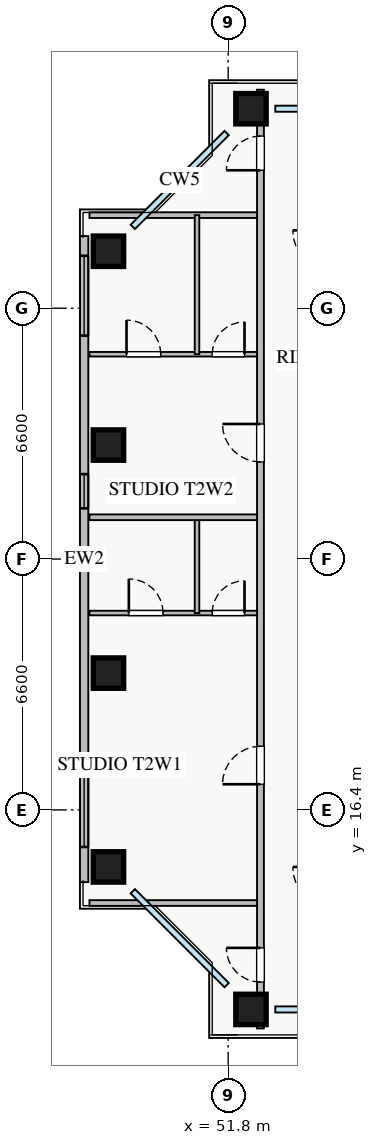
"""IFC4 building model, lengths in metres.
Left out: names, types, materials, properties, quantities, classifications, styles, units other than length and angle.
Written with IfcOpenShell. Run it as: python <this file> out.ifc"""

import sys

from ifc_helpers import new_model, si_unit, direction, frame, frame_2d, origin, origin_2d, place, context, subcontext, project, spatial, rectangle, extrude, source, transform, mapped, element, fill, save


model = new_model("IFC4")
c1 = context("Model", 3, precision=1e-05, world=origin(), true_north=direction((0.0, 1.0)))
c2 = subcontext(c1, "Body", "Model", "MODEL_VIEW")
j1 = project(units=[si_unit("LENGTHUNIT", "METRE"), si_unit("PLANEANGLEUNIT", "RADIAN")], contexts=[c1])
p1 = place(None, origin())
s1 = spatial("IfcSite", under=j1, at=p1, CompositionType="ELEMENT")
p2 = place(p1, origin())
s2 = spatial("IfcBuilding", under=s1, at=p2, CompositionType="ELEMENT")
p3 = place(p2, frame((0.0, 0.0, 73.0)))
s3 = spatial("IfcBuildingStorey", under=s2, at=p3, CompositionType="ELEMENT", Elevation=73.0)
m1 = source(origin(), c2, "Body", "SweptSolid", [
    extrude(rectangle(XDim=0.8, YDim=0.8, at=origin_2d()), origin(), (0.0, 0.0, 1.0), 3.25),
])
for number, where, z_axis, x_axis in (
    (1, (52.4, 11.15, 0.0), (0.0, 0.0, 1.0), (1.0, 0.0, 0.0)),
    (2, (52.4, 34.85, 0.0), (0.0, 0.0, 1.0), (1.0, 0.0, 0.0)),
    (3, (48.65, 14.9, 0.0), (0.0, 0.0, 1.0), (1.0, 0.0, 0.0)),
    (4, (48.65, 20.0, 0.0), (0.0, 0.0, 1.0), (1.0, 0.0, 0.0)),
    (5, (48.65, 26.0, 0.0), (0.0, 0.0, 1.0), (1.0, 0.0, 0.0)),
    (6, (48.65, 31.1, 0.0), (0.0, 0.0, 1.0), (1.0, 0.0, 0.0)),
):
    element("IfcColumn", number, at=place(p3, frame(where, z_axis=z_axis, x_axis=x_axis)), inside=s3, PredefinedType="COLUMN", context=c2, shape_type="MappedRepresentation", body=[
        mapped(m1, transform((0.0, 0.0, 0.0), x_axis=(1.0, 0.0, 0.0), y_axis=(0.0, 1.0, 0.0), z_axis=(0.0, 0.0, 1.0), scale=1.0)),
    ])
p4 = place(p3, frame((48.01, 14.5, 0.0), z_axis=(0.0, 0.0, 1.0), x_axis=(0.0, 1.0, 0.0)))
e7 = element("IfcWall", 7, at=p4, inside=s3, PredefinedType="STANDARD", context=c2, shape_type="SweptSolid", body=[
    extrude(rectangle(XDim=17.0, YDim=0.22, at=frame_2d((8.5, 0.0))), origin(), (0.0, 0.0, 1.0), 2.61),
])
p5 = place(p4, frame((0.925, 0.0, 0.9)))
e8 = element("IfcOpeningElement", 8, at=p5, cuts=e7, PredefinedType="OPENING", context=c2, shape_type="SweptSolid", body=[
    extrude(rectangle(XDim=2.4, YDim=1.48, at=frame_2d((1.2, 0.74))), frame((0.0, 0.12, 0.0), z_axis=(0.0, -1.0, 0.0), x_axis=(1.0, 0.0, 0.0)), (0.0, 0.0, 1.0), 0.24),
])
p6 = place(p4, frame((14.38, 0.0, 0.9)))
e9 = element("IfcOpeningElement", 9, at=p6, cuts=e7, PredefinedType="OPENING", context=c2, shape_type="SweptSolid", body=[
    extrude(rectangle(XDim=2.1, YDim=1.5, at=frame_2d((1.05, 0.75))), frame((0.0, 0.12, 0.0), z_axis=(0.0, -1.0, 0.0), x_axis=(1.0, 0.0, 0.0)), (0.0, 0.0, 1.0), 0.24),
])
p7 = place(p4, frame((9.835, 0.0, 0.9)))
e10 = element("IfcOpeningElement", 10, at=p7, cuts=e7, PredefinedType="OPENING", context=c2, shape_type="SweptSolid", body=[
    extrude(rectangle(XDim=0.9, YDim=1.2, at=frame_2d((0.45, 0.6))), frame((0.0, 0.12, 0.0), z_axis=(0.0, -1.0, 0.0), x_axis=(1.0, 0.0, 0.0)), (0.0, 0.0, 1.0), 0.24),
])
for number, where, z_axis, x_axis in (
    (11, (48.15, 32.05, 0.0), (0.0, 0.0, 1.0), (1.0, 0.0, 0.0)),
    (12, (48.15, 13.95, 0.0), (0.0, 0.0, 1.0), (1.0, 0.0, 0.0)),
):
    element("IfcWall", number, at=place(p3, frame(where, z_axis=z_axis, x_axis=x_axis)), inside=s3, PredefinedType="PARTITIONING", context=c2, shape_type="SweptSolid", body=[
        extrude(rectangle(XDim=4.5, YDim=0.15, at=frame_2d((2.25, 0.0))), origin(), (0.0, 0.0, 1.0), 3.07),
    ])
p8 = place(p3, frame((48.15, 21.58, 0.0), z_axis=(0.0, 0.0, 1.0), x_axis=(1.0, 0.0, 0.0)))
e13 = element("IfcWall", 13, at=p8, inside=s3, PredefinedType="PLUMBINGWALL", context=c2, shape_type="SweptSolid", body=[
    extrude(rectangle(XDim=4.5, YDim=0.12, at=frame_2d((2.25, 0.0))), origin(), (0.0, 0.0, 1.0), 3.07),
])
p9 = place(p8, frame((1.036, 0.0, 0.0)))
e14 = element("IfcOpeningElement", 14, at=p9, cuts=e13, PredefinedType="OPENING", context=c2, shape_type="SweptSolid", body=[
    extrude(rectangle(XDim=0.9, YDim=2.05, at=frame_2d((0.45, 1.025))), frame((0.0, 0.07, 0.0), z_axis=(0.0, -1.0, 0.0), x_axis=(1.0, 0.0, 0.0)), (0.0, 0.0, 1.0), 0.14),
])
p10 = place(p8, frame((3.23, 0.0, 0.0)))
e15 = element("IfcOpeningElement", 15, at=p10, cuts=e13, PredefinedType="OPENING", context=c2, shape_type="SweptSolid", body=[
    extrude(rectangle(XDim=0.85, YDim=2.05, at=frame_2d((0.425, 1.025))), frame((0.0, 0.07, 0.0), z_axis=(0.0, -1.0, 0.0), x_axis=(1.0, 0.0, 0.0)), (0.0, 0.0, 1.0), 0.14),
])
p11 = place(p3, frame((50.98, 21.58, 0.0), z_axis=(0.0, 0.0, 1.0), x_axis=(0.0, 1.0, 0.0)))
e16 = element("IfcWall", 16, at=p11, inside=s3, PredefinedType="PLUMBINGWALL", context=c2, shape_type="SweptSolid", body=[
    extrude(rectangle(XDim=2.52, YDim=0.12, at=frame_2d((1.26, 0.0))), origin(), (0.0, 0.0, 1.0), 3.07),
])
p12 = place(p3, frame((48.15, 28.39, 0.0), z_axis=(0.0, 0.0, 1.0), x_axis=(1.0, 0.0, 0.0)))
e17 = element("IfcWall", 17, at=p12, inside=s3, PredefinedType="PLUMBINGWALL", context=c2, shape_type="SweptSolid", body=[
    extrude(rectangle(XDim=4.5, YDim=0.12, at=frame_2d((2.25, 0.0))), origin(), (0.0, 0.0, 1.0), 3.07),
])
p13 = place(p12, frame((0.975, 0.0, 0.0)))
e18 = element("IfcOpeningElement", 18, at=p13, cuts=e17, PredefinedType="OPENING", context=c2, shape_type="SweptSolid", body=[
    extrude(rectangle(XDim=0.9, YDim=2.05, at=frame_2d((0.45, 1.025))), frame((0.0, 0.07, 0.0), z_axis=(0.0, -1.0, 0.0), x_axis=(1.0, 0.0, 0.0)), (0.0, 0.0, 1.0), 0.14),
])
p14 = place(p12, frame((3.23, 0.0, 0.0)))
e19 = element("IfcOpeningElement", 19, at=p14, cuts=e17, PredefinedType="OPENING", context=c2, shape_type="SweptSolid", body=[
    extrude(rectangle(XDim=0.85, YDim=2.05, at=frame_2d((0.425, 1.025))), frame((0.0, 0.07, 0.0), z_axis=(0.0, -1.0, 0.0), x_axis=(1.0, 0.0, 0.0)), (0.0, 0.0, 1.0), 0.14),
])
p15 = place(p3, frame((50.98, 28.39, 0.0), z_axis=(0.0, 0.0, 1.0), x_axis=(0.0, 1.0, 0.0)))
e20 = element("IfcWall", 20, at=p15, inside=s3, PredefinedType="PLUMBINGWALL", context=c2, shape_type="SweptSolid", body=[
    extrude(rectangle(XDim=3.66, YDim=0.12, at=frame_2d((1.83, 0.0))), origin(), (0.0, 0.0, 1.0), 3.07),
])
p16 = place(p3, frame((48.15, 24.1, 0.0), z_axis=(0.0, 0.0, 1.0), x_axis=(1.0, 0.0, 0.0)))
e21 = element("IfcWall", 21, at=p16, inside=s3, PredefinedType="PARTITIONING", context=c2, shape_type="SweptSolid", body=[
    extrude(rectangle(XDim=4.5, YDim=0.15, at=frame_2d((2.25, 0.0))), origin(), (0.0, 0.0, 1.0), 3.07),
])
p17 = place(p3, frame((52.65, 10.65, 0.0), z_axis=(0.0, 0.0, 1.0), x_axis=(0.0, 1.0, 0.0)))
e22 = element("IfcWall", 22, at=p17, inside=s3, PredefinedType="PARTITIONING", context=c2, shape_type="SweptSolid", body=[
    extrude(rectangle(XDim=24.7, YDim=0.18, at=frame_2d((12.35, 0.0))), origin(), (0.0, 0.0, 1.0), 2.615),
])
p18 = place(p17, frame((22.58, 0.0, 0.0)))
e23 = element("IfcOpeningElement", 23, at=p18, cuts=e22, PredefinedType="OPENING", context=c2, shape_type="SweptSolid", body=[
    extrude(rectangle(XDim=0.9, YDim=2.05, at=frame_2d((0.45, 1.025))), frame((0.0, 0.1, 0.0), z_axis=(0.0, -1.0, 0.0), x_axis=(1.0, 0.0, 0.0)), (0.0, 0.0, 1.0), 0.2),
])
p19 = place(p17, frame((1.22, 0.0, 0.0)))
e24 = element("IfcOpeningElement", 24, at=p19, cuts=e22, PredefinedType="OPENING", context=c2, shape_type="SweptSolid", body=[
    extrude(rectangle(XDim=0.9, YDim=2.05, at=frame_2d((0.45, 1.025))), frame((0.0, 0.1, 0.0), z_axis=(0.0, -1.0, 0.0), x_axis=(1.0, 0.0, 0.0)), (0.0, 0.0, 1.0), 0.2),
])
p20 = place(p17, frame((6.425, 0.0, 0.0)))
e25 = element("IfcOpeningElement", 25, at=p20, cuts=e22, PredefinedType="OPENING", context=c2, shape_type="SweptSolid", body=[
    extrude(rectangle(XDim=1.0, YDim=2.05, at=frame_2d((0.5, 1.025))), frame((0.0, 0.1, 0.0), z_axis=(0.0, -1.0, 0.0), x_axis=(1.0, 0.0, 0.0)), (0.0, 0.0, 1.0), 0.2),
])
p21 = place(p17, frame((14.905, 0.0, 0.0)))
e26 = element("IfcOpeningElement", 26, at=p21, cuts=e22, PredefinedType="OPENING", context=c2, shape_type="SweptSolid", body=[
    extrude(rectangle(XDim=1.0, YDim=2.05, at=frame_2d((0.5, 1.025))), frame((0.0, 0.1, 0.0), z_axis=(0.0, -1.0, 0.0), x_axis=(1.0, 0.0, 0.0)), (0.0, 0.0, 1.0), 0.2),
])
m2 = source(origin(), c2, "Body", "SweptSolid", [
    extrude(rectangle(XDim=2.4, YDim=1.48, at=frame_2d((1.2, 0.74))), frame((0.0, 0.03, 0.0), z_axis=(0.0, -1.0, 0.0), x_axis=(1.0, 0.0, 0.0)), (0.0, 0.0, 1.0), 0.06),
])
p22 = place(p5, origin())
e27 = element("IfcWindow", 27, at=p22, inside=s3, PartitioningType="TRIPLE_PANEL_VERTICAL", PredefinedType="WINDOW", context=c2, shape_type="MappedRepresentation", body=[
    mapped(m2, transform((0.0, 0.0, 0.0), x_axis=(1.0, 0.0, 0.0), y_axis=(0.0, 1.0, 0.0), z_axis=(0.0, 0.0, 1.0), scale=1.0)),
])
fill(e8, e27)
m3 = source(origin(), c2, "Body", "SweptSolid", [
    extrude(rectangle(XDim=2.1, YDim=1.5, at=frame_2d((1.05, 0.75))), frame((0.0, 0.03, 0.0), z_axis=(0.0, -1.0, 0.0), x_axis=(1.0, 0.0, 0.0)), (0.0, 0.0, 1.0), 0.06),
])
p23 = place(p6, origin())
e28 = element("IfcWindow", 28, at=p23, inside=s3, PartitioningType="TRIPLE_PANEL_VERTICAL", PredefinedType="WINDOW", context=c2, shape_type="MappedRepresentation", body=[
    mapped(m3, transform((0.0, 0.0, 0.0), x_axis=(1.0, 0.0, 0.0), y_axis=(0.0, 1.0, 0.0), z_axis=(0.0, 0.0, 1.0), scale=1.0)),
])
fill(e9, e28)
m4 = source(origin(), c2, "Body", "SweptSolid", [
    extrude(rectangle(XDim=0.9, YDim=2.05, at=frame_2d((0.45, 1.025))), frame((0.0, 0.025, 0.0), z_axis=(0.0, -1.0, 0.0), x_axis=(1.0, 0.0, 0.0)), (0.0, 0.0, 1.0), 0.05),
])
p24 = place(p9, origin())
e29 = element("IfcDoor", 29, at=p24, inside=s3, OperationType="SINGLE_SWING_LEFT", PredefinedType="DOOR", context=c2, shape_type="MappedRepresentation", body=[
    mapped(m4, transform((0.0, 0.0, 0.0), x_axis=(1.0, 0.0, 0.0), y_axis=(0.0, 1.0, 0.0), z_axis=(0.0, 0.0, 1.0), scale=1.0)),
])
fill(e14, e29)
m5 = source(origin(), c2, "Body", "SweptSolid", [
    extrude(rectangle(XDim=0.85, YDim=2.05, at=frame_2d((0.425, 1.025))), frame((0.0, 0.025, 0.0), z_axis=(0.0, -1.0, 0.0), x_axis=(1.0, 0.0, 0.0)), (0.0, 0.0, 1.0), 0.05),
])
p25 = place(p10, origin())
e30 = element("IfcDoor", 30, at=p25, inside=s3, OperationType="SINGLE_SWING_RIGHT", PredefinedType="DOOR", context=c2, shape_type="MappedRepresentation", body=[
    mapped(m5, transform((0.0, 0.0, 0.0), x_axis=(1.0, 0.0, 0.0), y_axis=(0.0, 1.0, 0.0), z_axis=(0.0, 0.0, 1.0), scale=1.0)),
])
fill(e15, e30)
p26 = place(p13, origin())
e31 = element("IfcDoor", 31, at=p26, inside=s3, OperationType="SINGLE_SWING_LEFT", PredefinedType="DOOR", context=c2, shape_type="MappedRepresentation", body=[
    mapped(m4, transform((0.0, 0.0, 0.0), x_axis=(1.0, 0.0, 0.0), y_axis=(0.0, 1.0, 0.0), z_axis=(0.0, 0.0, 1.0), scale=1.0)),
])
fill(e18, e31)
p27 = place(p14, origin())
e32 = element("IfcDoor", 32, at=p27, inside=s3, OperationType="SINGLE_SWING_RIGHT", PredefinedType="DOOR", context=c2, shape_type="MappedRepresentation", body=[
    mapped(m5, transform((0.0, 0.0, 0.0), x_axis=(1.0, 0.0, 0.0), y_axis=(0.0, 1.0, 0.0), z_axis=(0.0, 0.0, 1.0), scale=1.0)),
])
fill(e19, e32)
p28 = place(p18, origin())
e33 = element("IfcDoor", 33, at=p28, inside=s3, OperationType="SINGLE_SWING_LEFT", PredefinedType="DOOR", context=c2, shape_type="MappedRepresentation", body=[
    mapped(m4, transform((0.0, 0.0, 0.0), x_axis=(1.0, 0.0, 0.0), y_axis=(0.0, 1.0, 0.0), z_axis=(0.0, 0.0, 1.0), scale=1.0)),
])
fill(e23, e33)
p29 = place(p19, origin())
e34 = element("IfcDoor", 34, at=p29, inside=s3, OperationType="SINGLE_SWING_RIGHT", PredefinedType="DOOR", context=c2, shape_type="MappedRepresentation", body=[
    mapped(m4, transform((0.0, 0.0, 0.0), x_axis=(1.0, 0.0, 0.0), y_axis=(0.0, 1.0, 0.0), z_axis=(0.0, 0.0, 1.0), scale=1.0)),
])
fill(e24, e34)
m6 = source(origin(), c2, "Body", "SweptSolid", [
    extrude(rectangle(XDim=1.0, YDim=2.05, at=frame_2d((0.5, 1.025))), frame((0.0, 0.025, 0.0), z_axis=(0.0, -1.0, 0.0), x_axis=(1.0, 0.0, 0.0)), (0.0, 0.0, 1.0), 0.05),
])
p30 = place(p20, origin())
e35 = element("IfcDoor", 35, at=p30, inside=s3, OperationType="SINGLE_SWING_LEFT", PredefinedType="DOOR", context=c2, shape_type="MappedRepresentation", body=[
    mapped(m6, transform((0.0, 0.0, 0.0), x_axis=(1.0, 0.0, 0.0), y_axis=(0.0, 1.0, 0.0), z_axis=(0.0, 0.0, 1.0), scale=1.0)),
])
fill(e25, e35)
p31 = place(p21, origin())
e36 = element("IfcDoor", 36, at=p31, inside=s3, OperationType="SINGLE_SWING_RIGHT", PredefinedType="DOOR", context=c2, shape_type="MappedRepresentation", body=[
    mapped(m6, transform((0.0, 0.0, 0.0), x_axis=(1.0, 0.0, 0.0), y_axis=(0.0, 1.0, 0.0), z_axis=(0.0, 0.0, 1.0), scale=1.0)),
])
fill(e26, e36)
m7 = source(origin(), c2, "Body", "SweptSolid", [
    extrude(rectangle(XDim=0.9, YDim=1.2, at=frame_2d((0.45, 0.6))), frame((0.0, 0.03, 0.0), z_axis=(0.0, -1.0, 0.0), x_axis=(1.0, 0.0, 0.0)), (0.0, 0.0, 1.0), 0.06),
])
p32 = place(p7, origin())
e37 = element("IfcWindow", 37, at=p32, inside=s3, PartitioningType="SINGLE_PANEL", PredefinedType="WINDOW", context=c2, shape_type="MappedRepresentation", body=[
    mapped(m7, transform((0.0, 0.0, 0.0), x_axis=(1.0, 0.0, 0.0), y_axis=(0.0, 1.0, 0.0), z_axis=(0.0, 0.0, 1.0), scale=1.0)),
])
fill(e10, e37)
save(model, sys.argv[1])
